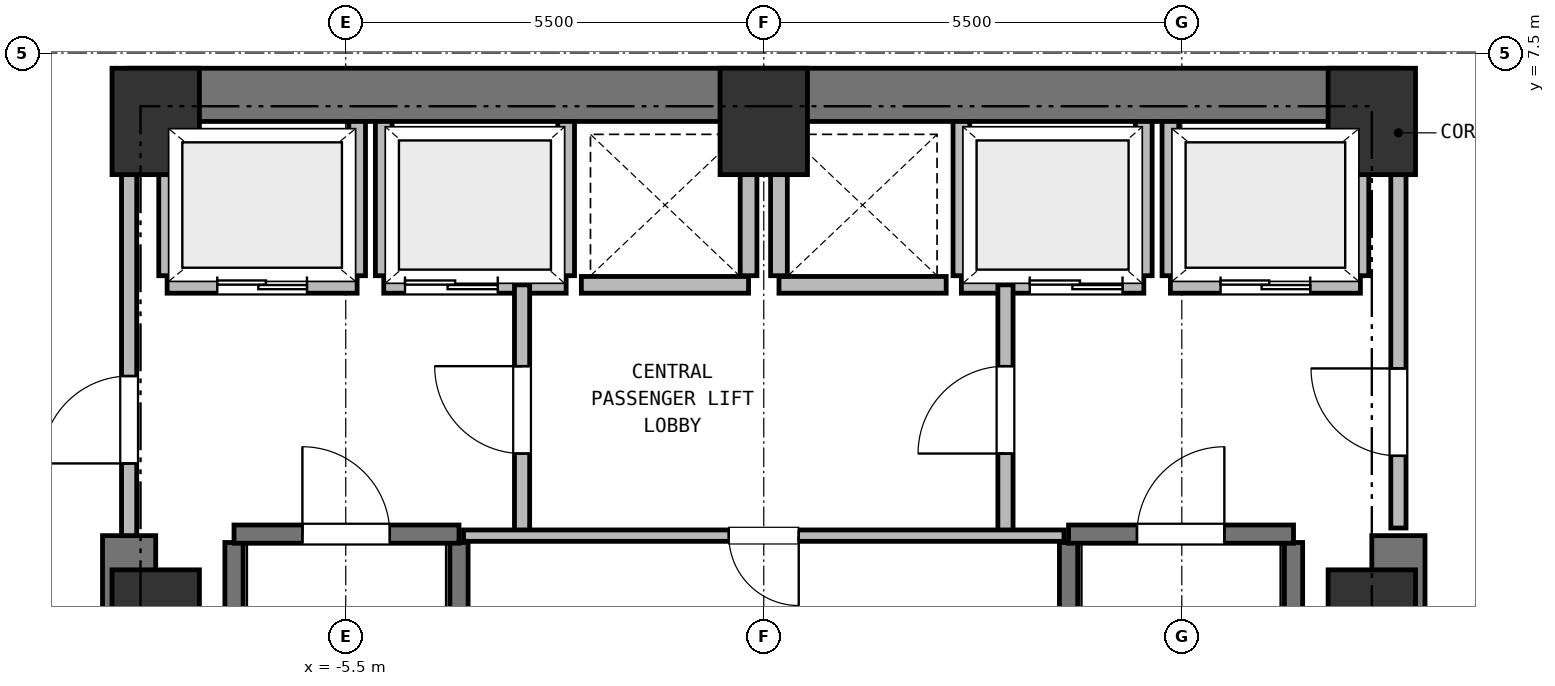
"""IFC4 building model, lengths in metres.
Left out: names, types, materials, properties, quantities, classifications, styles, units other than length and angle.
Written with IfcOpenShell. Run it as: python <this file> out.ifc"""

import sys

from ifc_helpers import new_model, si_unit, direction, frame, frame_2d, origin, origin_2d, place, context, subcontext, project, spatial, rectangle, extrude, element, fill, save


model = new_model("IFC4")
c1 = context("Model", 3, precision=1e-05, world=origin(), true_north=direction((0.0, 1.0)))
c2 = subcontext(c1, "Body", "Model", "MODEL_VIEW")
j1 = project(units=[si_unit("LENGTHUNIT", "METRE"), si_unit("PLANEANGLEUNIT", "RADIAN")], contexts=[c1])
p1 = place(None, origin())
s1 = spatial("IfcSite", under=j1, at=p1, CompositionType="ELEMENT")
p2 = place(p1, origin())
s2 = spatial("IfcBuilding", under=s1, at=p2, CompositionType="ELEMENT")
p3 = place(p2, frame((0.0, 0.0, 60.5)))
s3 = spatial("IfcBuildingStorey", under=s2, at=p3, CompositionType="ELEMENT", Elevation=60.5)
for number, where, z_axis, x_axis in (
    (1, (8.0, 0.0, 0.0), (0.0, 0.0, 1.0), (1.0, 0.0, 0.0)),
    (2, (8.0, 6.6, 0.0), (0.0, 0.0, 1.0), (1.0, 0.0, 0.0)),
    (3, (0.0, 6.6, 0.0), (0.0, 0.0, 1.0), (1.0, 0.0, 0.0)),
    (4, (-8.0, 6.6, 0.0), (0.0, 0.0, 1.0), (1.0, 0.0, 0.0)),
    (5, (-8.0, 0.0, 0.0), (0.0, 0.0, 1.0), (1.0, 0.0, 0.0)),
):
    element("IfcColumn", number, at=place(p3, frame(where, z_axis=z_axis, x_axis=x_axis)), inside=s3, PredefinedType="COLUMN", context=c2, shape_type="SweptSolid", body=[
        extrude(rectangle(XDim=1.15, YDim=1.4, at=origin_2d()), origin(), (0.0, 0.0, 1.0), 3.75),
    ])
p4 = place(p3, frame((-8.35, 6.95, 0.0), z_axis=(0.0, 0.0, 1.0), x_axis=(1.0, 0.0, 0.0)))
e6 = element("IfcWall", 6, at=p4, inside=s3, PredefinedType="SHEAR", context=c2, shape_type="SweptSolid", body=[
    extrude(rectangle(XDim=16.7, YDim=0.7, at=frame_2d((8.35, 0.0))), origin(), (0.0, 0.0, 1.0), 3.5),
])
for number, where, z_axis, x_axis in (
    (7, (-8.35, -6.95, 0.0), (0.0, 0.0, 1.0), (0.0, 1.0, 0.0)),
    (8, (8.35, -6.95, 0.0), (0.0, 0.0, 1.0), (0.0, 1.0, 0.0)),
):
    element("IfcWall", number, at=place(p3, frame(where, z_axis=z_axis, x_axis=x_axis)), inside=s3, PredefinedType="SHEAR", context=c2, shape_type="SweptSolid", body=[
        extrude(rectangle(XDim=8.1, YDim=0.7, at=frame_2d((4.05, 0.0))), origin(), (0.0, 0.0, 1.0), 3.5),
    ])
for number, where, z_axis, x_axis in (
    (9, (-6.97, -6.16, 0.0), (0.0, 0.0, 1.0), (0.0, 1.0, 0.0)),
    (10, (-4.01, -6.16, 0.0), (0.0, 0.0, 1.0), (0.0, 1.0, 0.0)),
):
    element("IfcWall", number, at=place(p3, frame(where, z_axis=z_axis, x_axis=x_axis)), inside=s3, PredefinedType="SHEAR", context=c2, shape_type="SweptSolid", body=[
        extrude(rectangle(XDim=7.22, YDim=0.24, at=frame_2d((3.61, 0.0))), origin(), (0.0, 0.0, 1.0), 3.5),
    ])
p5 = place(p3, frame((-6.97, 1.17, 0.0), z_axis=(0.0, 0.0, 1.0), x_axis=(1.0, 0.0, 0.0)))
e11 = element("IfcWall", 11, at=p5, inside=s3, PredefinedType="SHEAR", context=c2, shape_type="SweptSolid", body=[
    extrude(rectangle(XDim=2.96, YDim=0.24, at=frame_2d((1.48, 0.0))), origin(), (0.0, 0.0, 1.0), 3.5),
])
p6 = place(p5, frame((0.9, 0.0, 0.0)))
e12 = element("IfcOpeningElement", 12, at=p6, cuts=e11, PredefinedType="OPENING", context=c2, shape_type="SweptSolid", body=[
    extrude(rectangle(XDim=1.15, YDim=2.15, at=frame_2d((0.575, 1.075))), frame((0.0, 0.13, 0.0), z_axis=(0.0, -1.0, 0.0), x_axis=(1.0, 0.0, 0.0)), (0.0, 0.0, 1.0), 0.26),
])
for number, where, z_axis, x_axis in (
    (13, (4.01, -6.16, 0.0), (0.0, 0.0, 1.0), (0.0, 1.0, 0.0)),
    (14, (6.97, -6.16, 0.0), (0.0, 0.0, 1.0), (0.0, 1.0, 0.0)),
):
    element("IfcWall", number, at=place(p3, frame(where, z_axis=z_axis, x_axis=x_axis)), inside=s3, PredefinedType="SHEAR", context=c2, shape_type="SweptSolid", body=[
        extrude(rectangle(XDim=7.22, YDim=0.24, at=frame_2d((3.61, 0.0))), origin(), (0.0, 0.0, 1.0), 3.5),
    ])
p7 = place(p3, frame((4.01, 1.17, 0.0), z_axis=(0.0, 0.0, 1.0), x_axis=(1.0, 0.0, 0.0)))
e15 = element("IfcWall", 15, at=p7, inside=s3, PredefinedType="SHEAR", context=c2, shape_type="SweptSolid", body=[
    extrude(rectangle(XDim=2.96, YDim=0.24, at=frame_2d((1.48, 0.0))), origin(), (0.0, 0.0, 1.0), 3.5),
])
p8 = place(p7, frame((0.9, 0.0, 0.0)))
e16 = element("IfcOpeningElement", 16, at=p8, cuts=e15, PredefinedType="OPENING", context=c2, shape_type="SweptSolid", body=[
    extrude(rectangle(XDim=1.15, YDim=2.15, at=frame_2d((0.575, 1.075))), frame((0.0, 0.13, 0.0), z_axis=(0.0, -1.0, 0.0), x_axis=(1.0, 0.0, 0.0)), (0.0, 0.0, 1.0), 0.26),
])
p9 = place(p3, frame((-7.85, 4.45, 0.0), z_axis=(0.0, 0.0, 1.0), x_axis=(1.0, 0.0, 0.0)))
e17 = element("IfcWall", 17, at=p9, inside=s3, PredefinedType="PARTITIONING", context=c2, shape_type="SweptSolid", body=[
    extrude(rectangle(XDim=2.5, YDim=0.22, at=frame_2d((1.25, 0.0))), origin(), (0.0, 0.0, 1.0), 3.5),
])
p10 = place(p9, frame((0.66, 0.0, 0.0)))
e18 = element("IfcOpeningElement", 18, at=p10, cuts=e17, PredefinedType="OPENING", context=c2, shape_type="SweptSolid", body=[
    extrude(rectangle(XDim=1.18, YDim=2.15, at=frame_2d((0.59, 1.075))), frame((0.0, 0.12, 0.0), z_axis=(0.0, -1.0, 0.0), x_axis=(1.0, 0.0, 0.0)), (0.0, 0.0, 1.0), 0.24),
])
p11 = place(p3, frame((-7.85, 4.57, 0.0), z_axis=(0.0, 0.0, 1.0), x_axis=(0.0, 1.0, 0.0)))
e19 = element("IfcWall", 19, at=p11, inside=s3, PredefinedType="PARTITIONING", context=c2, shape_type="SweptSolid", body=[
    extrude(rectangle(XDim=2.03, YDim=0.22, at=frame_2d((1.015, 0.0))), origin(), (0.0, 0.0, 1.0), 3.08),
])
p12 = place(p3, frame((-5.35, 4.57, 0.0), z_axis=(0.0, 0.0, 1.0), x_axis=(0.0, 1.0, 0.0)))
e20 = element("IfcWall", 20, at=p12, inside=s3, PredefinedType="PARTITIONING", context=c2, shape_type="SweptSolid", body=[
    extrude(rectangle(XDim=2.03, YDim=0.22, at=frame_2d((1.015, 0.0))), origin(), (0.0, 0.0, 1.0), 3.5),
])
p13 = place(p3, frame((5.35, 4.45, 0.0), z_axis=(0.0, 0.0, 1.0), x_axis=(1.0, 0.0, 0.0)))
e21 = element("IfcWall", 21, at=p13, inside=s3, PredefinedType="PARTITIONING", context=c2, shape_type="SweptSolid", body=[
    extrude(rectangle(XDim=2.5, YDim=0.22, at=frame_2d((1.25, 0.0))), origin(), (0.0, 0.0, 1.0), 3.5),
])
p14 = place(p13, frame((0.66, 0.0, 0.0)))
e22 = element("IfcOpeningElement", 22, at=p14, cuts=e21, PredefinedType="OPENING", context=c2, shape_type="SweptSolid", body=[
    extrude(rectangle(XDim=1.18, YDim=2.15, at=frame_2d((0.59, 1.075))), frame((0.0, 0.12, 0.0), z_axis=(0.0, -1.0, 0.0), x_axis=(1.0, 0.0, 0.0)), (0.0, 0.0, 1.0), 0.24),
])
p15 = place(p3, frame((5.35, 4.57, 0.0), z_axis=(0.0, 0.0, 1.0), x_axis=(0.0, 1.0, 0.0)))
e23 = element("IfcWall", 23, at=p15, inside=s3, PredefinedType="PARTITIONING", context=c2, shape_type="SweptSolid", body=[
    extrude(rectangle(XDim=2.03, YDim=0.22, at=frame_2d((1.015, 0.0))), origin(), (0.0, 0.0, 1.0), 3.5),
])
p16 = place(p3, frame((7.85, 4.57, 0.0), z_axis=(0.0, 0.0, 1.0), x_axis=(0.0, 1.0, 0.0)))
e24 = element("IfcWall", 24, at=p16, inside=s3, PredefinedType="PARTITIONING", context=c2, shape_type="SweptSolid", body=[
    extrude(rectangle(XDim=2.03, YDim=0.22, at=frame_2d((1.015, 0.0))), origin(), (0.0, 0.0, 1.0), 3.08),
])
p17 = place(p3, frame((-5.0, 4.45, 0.0), z_axis=(0.0, 0.0, 1.0), x_axis=(1.0, 0.0, 0.0)))
e25 = element("IfcWall", 25, at=p17, inside=s3, PredefinedType="PARTITIONING", context=c2, shape_type="SweptSolid", body=[
    extrude(rectangle(XDim=2.4, YDim=0.22, at=frame_2d((1.2, 0.0))), origin(), (0.0, 0.0, 1.0), 3.5),
])
p18 = place(p17, frame((0.28, 0.0, 0.0)))
e26 = element("IfcOpeningElement", 26, at=p18, cuts=e25, PredefinedType="OPENING", context=c2, shape_type="SweptSolid", body=[
    extrude(rectangle(XDim=1.22, YDim=2.15, at=frame_2d((0.61, 1.075))), frame((0.0, 0.12, 0.0), z_axis=(0.0, -1.0, 0.0), x_axis=(1.0, 0.0, 0.0)), (0.0, 0.0, 1.0), 0.24),
])
for number, where, z_axis, x_axis in (
    (27, (-5.0, 4.57, 0.0), (0.0, 0.0, 1.0), (0.0, 1.0, 0.0)),
    (28, (-2.6, 4.57, 0.0), (0.0, 0.0, 1.0), (0.0, 1.0, 0.0)),
):
    element("IfcWall", number, at=place(p3, frame(where, z_axis=z_axis, x_axis=x_axis)), inside=s3, PredefinedType="PARTITIONING", context=c2, shape_type="SweptSolid", body=[
        extrude(rectangle(XDim=2.03, YDim=0.22, at=frame_2d((1.015, 0.0))), origin(), (0.0, 0.0, 1.0), 3.5),
    ])
p19 = place(p3, frame((2.6, 4.45, 0.0), z_axis=(0.0, 0.0, 1.0), x_axis=(1.0, 0.0, 0.0)))
e29 = element("IfcWall", 29, at=p19, inside=s3, PredefinedType="PARTITIONING", context=c2, shape_type="SweptSolid", body=[
    extrude(rectangle(XDim=2.4, YDim=0.22, at=frame_2d((1.2, 0.0))), origin(), (0.0, 0.0, 1.0), 3.5),
])
p20 = place(p19, frame((0.9, 0.0, 0.0)))
e30 = element("IfcOpeningElement", 30, at=p20, cuts=e29, PredefinedType="OPENING", context=c2, shape_type="SweptSolid", body=[
    extrude(rectangle(XDim=1.22, YDim=2.15, at=frame_2d((0.61, 1.075))), frame((0.0, 0.12, 0.0), z_axis=(0.0, -1.0, 0.0), x_axis=(1.0, 0.0, 0.0)), (0.0, 0.0, 1.0), 0.24),
])
for number, where, z_axis, x_axis in (
    (31, (2.6, 4.57, 0.0), (0.0, 0.0, 1.0), (0.0, 1.0, 0.0)),
    (32, (5.0, 4.57, 0.0), (0.0, 0.0, 1.0), (0.0, 1.0, 0.0)),
):
    element("IfcWall", number, at=place(p3, frame(where, z_axis=z_axis, x_axis=x_axis)), inside=s3, PredefinedType="PARTITIONING", context=c2, shape_type="SweptSolid", body=[
        extrude(rectangle(XDim=2.03, YDim=0.22, at=frame_2d((1.015, 0.0))), origin(), (0.0, 0.0, 1.0), 3.5),
    ])
p21 = place(p3, frame((-2.4, 4.45, 0.0), z_axis=(0.0, 0.0, 1.0), x_axis=(1.0, 0.0, 0.0)))
e33 = element("IfcWall", 33, at=p21, inside=s3, PredefinedType="PARTITIONING", context=c2, shape_type="SweptSolid", body=[
    extrude(rectangle(XDim=2.2, YDim=0.22, at=frame_2d((1.1, 0.0))), origin(), (0.0, 0.0, 1.0), 3.5),
])
p22 = place(p3, frame((-0.2, 4.57, 0.0), z_axis=(0.0, 0.0, 1.0), x_axis=(0.0, 1.0, 0.0)))
e34 = element("IfcWall", 34, at=p22, inside=s3, PredefinedType="PARTITIONING", context=c2, shape_type="SweptSolid", body=[
    extrude(rectangle(XDim=2.03, YDim=0.22, at=frame_2d((1.015, 0.0))), origin(), (0.0, 0.0, 1.0), 3.5),
])
p23 = place(p3, frame((0.2, 4.45, 0.0), z_axis=(0.0, 0.0, 1.0), x_axis=(1.0, 0.0, 0.0)))
e35 = element("IfcWall", 35, at=p23, inside=s3, PredefinedType="PARTITIONING", context=c2, shape_type="SweptSolid", body=[
    extrude(rectangle(XDim=2.2, YDim=0.22, at=frame_2d((1.1, 0.0))), origin(), (0.0, 0.0, 1.0), 3.5),
])
p24 = place(p3, frame((0.2, 4.57, 0.0), z_axis=(0.0, 0.0, 1.0), x_axis=(0.0, 1.0, 0.0)))
e36 = element("IfcWall", 36, at=p24, inside=s3, PredefinedType="PARTITIONING", context=c2, shape_type="SweptSolid", body=[
    extrude(rectangle(XDim=2.03, YDim=0.22, at=frame_2d((1.015, 0.0))), origin(), (0.0, 0.0, 1.0), 3.5),
])
p25 = place(p3, frame((-3.18, 1.15, 0.0), z_axis=(0.0, 0.0, 1.0), x_axis=(0.0, 1.0, 0.0)))
e37 = element("IfcWall", 37, at=p25, inside=s3, PredefinedType="PARTITIONING", context=c2, shape_type="SweptSolid", body=[
    extrude(rectangle(XDim=3.3, YDim=0.2, at=frame_2d((1.65, 0.0))), origin(), (0.0, 0.0, 1.0), 3.5),
])
p26 = place(p25, frame((1.08, 0.0, 0.0)))
e38 = element("IfcOpeningElement", 38, at=p26, cuts=e37, PredefinedType="OPENING", context=c2, shape_type="SweptSolid", body=[
    extrude(rectangle(XDim=1.15, YDim=2.15, at=frame_2d((0.575, 1.075))), frame((0.0, 0.11, 0.0), z_axis=(0.0, -1.0, 0.0), x_axis=(1.0, 0.0, 0.0)), (0.0, 0.0, 1.0), 0.22),
])
p27 = place(p3, frame((3.18, 1.15, 0.0), z_axis=(0.0, 0.0, 1.0), x_axis=(0.0, 1.0, 0.0)))
e39 = element("IfcWall", 39, at=p27, inside=s3, PredefinedType="PARTITIONING", context=c2, shape_type="SweptSolid", body=[
    extrude(rectangle(XDim=3.3, YDim=0.2, at=frame_2d((1.65, 0.0))), origin(), (0.0, 0.0, 1.0), 3.5),
])
p28 = place(p27, frame((1.08, 0.0, 0.0)))
e40 = element("IfcOpeningElement", 40, at=p28, cuts=e39, PredefinedType="OPENING", context=c2, shape_type="SweptSolid", body=[
    extrude(rectangle(XDim=1.15, YDim=2.15, at=frame_2d((0.575, 1.075))), frame((0.0, 0.11, 0.0), z_axis=(0.0, -1.0, 0.0), x_axis=(1.0, 0.0, 0.0)), (0.0, 0.0, 1.0), 0.22),
])
p29 = place(p3, frame((-8.35, 1.15, 0.0), z_axis=(0.0, 0.0, 1.0), x_axis=(0.0, 1.0, 0.0)))
e41 = element("IfcWall", 41, at=p29, inside=s3, PredefinedType="PARTITIONING", context=c2, shape_type="SweptSolid", body=[
    extrude(rectangle(XDim=5.4, YDim=0.2, at=frame_2d((2.7, 0.0))), origin(), (0.0, 0.0, 1.0), 3.5),
])
p30 = place(p29, frame((0.95, 0.0, 0.0)))
e42 = element("IfcOpeningElement", 42, at=p30, cuts=e41, PredefinedType="OPENING", context=c2, shape_type="SweptSolid", body=[
    extrude(rectangle(XDim=1.15, YDim=2.15, at=frame_2d((0.575, 1.075))), frame((0.0, 0.11, 0.0), z_axis=(0.0, -1.0, 0.0), x_axis=(1.0, 0.0, 0.0)), (0.0, 0.0, 1.0), 0.22),
])
p31 = place(p3, frame((8.35, 1.25, 0.0), z_axis=(0.0, 0.0, 1.0), x_axis=(0.0, 1.0, 0.0)))
e43 = element("IfcWall", 43, at=p31, inside=s3, PredefinedType="PARTITIONING", context=c2, shape_type="SweptSolid", body=[
    extrude(rectangle(XDim=5.3, YDim=0.2, at=frame_2d((2.65, 0.0))), origin(), (0.0, 0.0, 1.0), 3.5),
])
p32 = place(p31, frame((0.95, 0.0, 0.0)))
e44 = element("IfcOpeningElement", 44, at=p32, cuts=e43, PredefinedType="OPENING", context=c2, shape_type="SweptSolid", body=[
    extrude(rectangle(XDim=1.15, YDim=2.15, at=frame_2d((0.575, 1.075))), frame((0.0, 0.11, 0.0), z_axis=(0.0, -1.0, 0.0), x_axis=(1.0, 0.0, 0.0)), (0.0, 0.0, 1.0), 0.22),
])
p33 = place(p3, frame((3.95, 1.15, 0.0), z_axis=(0.0, 0.0, 1.0), x_axis=(-1.0, 0.0, 0.0)))
e45 = element("IfcWall", 45, at=p33, inside=s3, PredefinedType="PARTITIONING", context=c2, shape_type="SweptSolid", body=[
    extrude(rectangle(XDim=7.9, YDim=0.15, at=frame_2d((3.95, 0.0))), origin(), (0.0, 0.0, 1.0), 3.5),
])
p34 = place(p33, frame((3.49, 0.0, 0.0)))
e46 = element("IfcOpeningElement", 46, at=p34, cuts=e45, PredefinedType="OPENING", context=c2, shape_type="SweptSolid", body=[
    extrude(rectangle(XDim=0.92, YDim=2.05, at=frame_2d((0.46, 1.025))), frame((0.0, 0.085, 0.0), z_axis=(0.0, -1.0, 0.0), x_axis=(1.0, 0.0, 0.0)), (0.0, 0.0, 1.0), 0.17),
])
p35 = place(p3, frame((8.578, 9.352, 0.0), z_axis=(0.0, 0.0, 1.0), x_axis=(0.707067066127, -0.707146494016, 0.0)))
e47 = element("IfcWall", 47, at=p35, inside=s3, PredefinedType="PARTITIONING", context=c2, shape_type="SweptSolid", body=[
    extrude(rectangle(XDim=3.074, YDim=0.15, at=frame_2d((1.537, 0.0))), origin(), (0.0, 0.0, 1.0), 3.5),
])
p36 = place(p35, frame((1.676, 0.0, 0.0)))
e48 = element("IfcOpeningElement", 48, at=p36, cuts=e47, PredefinedType="OPENING", context=c2, shape_type="SweptSolid", body=[
    extrude(rectangle(XDim=1.0, YDim=2.15, at=frame_2d((0.5, 1.075))), frame((0.0, 0.085, 0.0), z_axis=(0.0, -1.0, 0.0), x_axis=(1.0, 0.0, 0.0)), (0.0, 0.0, 1.0), 0.17),
])
p37 = place(p3, frame((-10.752, 7.178, 0.0), z_axis=(0.0, 0.0, 1.0), x_axis=(0.707067066127, 0.707146494016, 0.0)))
e49 = element("IfcWall", 49, at=p37, inside=s3, PredefinedType="PARTITIONING", context=c2, shape_type="SweptSolid", body=[
    extrude(rectangle(XDim=3.074, YDim=0.15, at=frame_2d((1.537, 0.0))), origin(), (0.0, 0.0, 1.0), 3.5),
])
p38 = place(p6, origin())
e50 = element("IfcDoor", 50, at=p38, inside=s3, OperationType="SINGLE_SWING_LEFT", PredefinedType="DOOR", context=c2, shape_type="SweptSolid", body=[
    extrude(rectangle(XDim=1.15, YDim=2.15, at=frame_2d((0.575, 1.075))), frame((0.0, 0.025, 0.0), z_axis=(0.0, -1.0, 0.0), x_axis=(1.0, 0.0, 0.0)), (0.0, 0.0, 1.0), 0.05),
])
fill(e12, e50)
p39 = place(p8, origin())
e51 = element("IfcDoor", 51, at=p39, inside=s3, OperationType="SINGLE_SWING_RIGHT", PredefinedType="DOOR", context=c2, shape_type="SweptSolid", body=[
    extrude(rectangle(XDim=1.15, YDim=2.15, at=frame_2d((0.575, 1.075))), frame((0.0, 0.025, 0.0), z_axis=(0.0, -1.0, 0.0), x_axis=(1.0, 0.0, 0.0)), (0.0, 0.0, 1.0), 0.05),
])
fill(e16, e51)
p40 = place(p10, origin())
e52 = element("IfcDoor", 52, at=p40, inside=s3, OperationType="DOUBLE_DOOR_SLIDING", PredefinedType="DOOR", context=c2, shape_type="SweptSolid", body=[
    extrude(rectangle(XDim=1.18, YDim=2.15, at=frame_2d((0.59, 1.075))), frame((0.0, 0.025, 0.0), z_axis=(0.0, -1.0, 0.0), x_axis=(1.0, 0.0, 0.0)), (0.0, 0.0, 1.0), 0.05),
])
fill(e18, e52)
p41 = place(p14, origin())
e53 = element("IfcDoor", 53, at=p41, inside=s3, OperationType="DOUBLE_DOOR_SLIDING", PredefinedType="DOOR", context=c2, shape_type="SweptSolid", body=[
    extrude(rectangle(XDim=1.18, YDim=2.15, at=frame_2d((0.59, 1.075))), frame((0.0, 0.025, 0.0), z_axis=(0.0, -1.0, 0.0), x_axis=(1.0, 0.0, 0.0)), (0.0, 0.0, 1.0), 0.05),
])
fill(e22, e53)
p42 = place(p18, origin())
e54 = element("IfcDoor", 54, at=p42, inside=s3, OperationType="DOUBLE_DOOR_SLIDING", PredefinedType="DOOR", context=c2, shape_type="SweptSolid", body=[
    extrude(rectangle(XDim=1.22, YDim=2.15, at=frame_2d((0.61, 1.075))), frame((0.0, 0.025, 0.0), z_axis=(0.0, -1.0, 0.0), x_axis=(1.0, 0.0, 0.0)), (0.0, 0.0, 1.0), 0.05),
])
fill(e26, e54)
p43 = place(p20, origin())
e55 = element("IfcDoor", 55, at=p43, inside=s3, OperationType="DOUBLE_DOOR_SLIDING", PredefinedType="DOOR", context=c2, shape_type="SweptSolid", body=[
    extrude(rectangle(XDim=1.22, YDim=2.15, at=frame_2d((0.61, 1.075))), frame((0.0, 0.025, 0.0), z_axis=(0.0, -1.0, 0.0), x_axis=(1.0, 0.0, 0.0)), (0.0, 0.0, 1.0), 0.05),
])
fill(e30, e55)
p44 = place(p26, origin())
e56 = element("IfcDoor", 56, at=p44, inside=s3, OperationType="SINGLE_SWING_RIGHT", PredefinedType="DOOR", context=c2, shape_type="SweptSolid", body=[
    extrude(rectangle(XDim=1.15, YDim=2.15, at=frame_2d((0.575, 1.075))), frame((0.0, 0.025, 0.0), z_axis=(0.0, -1.0, 0.0), x_axis=(1.0, 0.0, 0.0)), (0.0, 0.0, 1.0), 0.05),
])
fill(e38, e56)
p45 = place(p28, origin())
e57 = element("IfcDoor", 57, at=p45, inside=s3, OperationType="SINGLE_SWING_LEFT", PredefinedType="DOOR", context=c2, shape_type="SweptSolid", body=[
    extrude(rectangle(XDim=1.15, YDim=2.15, at=frame_2d((0.575, 1.075))), frame((0.0, 0.025, 0.0), z_axis=(0.0, -1.0, 0.0), x_axis=(1.0, 0.0, 0.0)), (0.0, 0.0, 1.0), 0.05),
])
fill(e40, e57)
p46 = place(p30, origin())
e58 = element("IfcDoor", 58, at=p46, inside=s3, OperationType="SINGLE_SWING_LEFT", PredefinedType="DOOR", context=c2, shape_type="SweptSolid", body=[
    extrude(rectangle(XDim=1.15, YDim=2.15, at=frame_2d((0.575, 1.075))), frame((0.0, 0.025, 0.0), z_axis=(0.0, -1.0, 0.0), x_axis=(1.0, 0.0, 0.0)), (0.0, 0.0, 1.0), 0.05),
])
fill(e42, e58)
p47 = place(p32, origin())
e59 = element("IfcDoor", 59, at=p47, inside=s3, OperationType="SINGLE_SWING_RIGHT", PredefinedType="DOOR", context=c2, shape_type="SweptSolid", body=[
    extrude(rectangle(XDim=1.15, YDim=2.15, at=frame_2d((0.575, 1.075))), frame((0.0, 0.025, 0.0), z_axis=(0.0, -1.0, 0.0), x_axis=(1.0, 0.0, 0.0)), (0.0, 0.0, 1.0), 0.05),
])
fill(e44, e59)
p48 = place(p34, origin())
e60 = element("IfcDoor", 60, at=p48, inside=s3, OperationType="SINGLE_SWING_LEFT", PredefinedType="DOOR", context=c2, shape_type="SweptSolid", body=[
    extrude(rectangle(XDim=0.92, YDim=2.05, at=frame_2d((0.46, 1.025))), frame((0.0, 0.025, 0.0), z_axis=(0.0, -1.0, 0.0), x_axis=(1.0, 0.0, 0.0)), (0.0, 0.0, 1.0), 0.05),
])
fill(e46, e60)
save(model, sys.argv[1])
